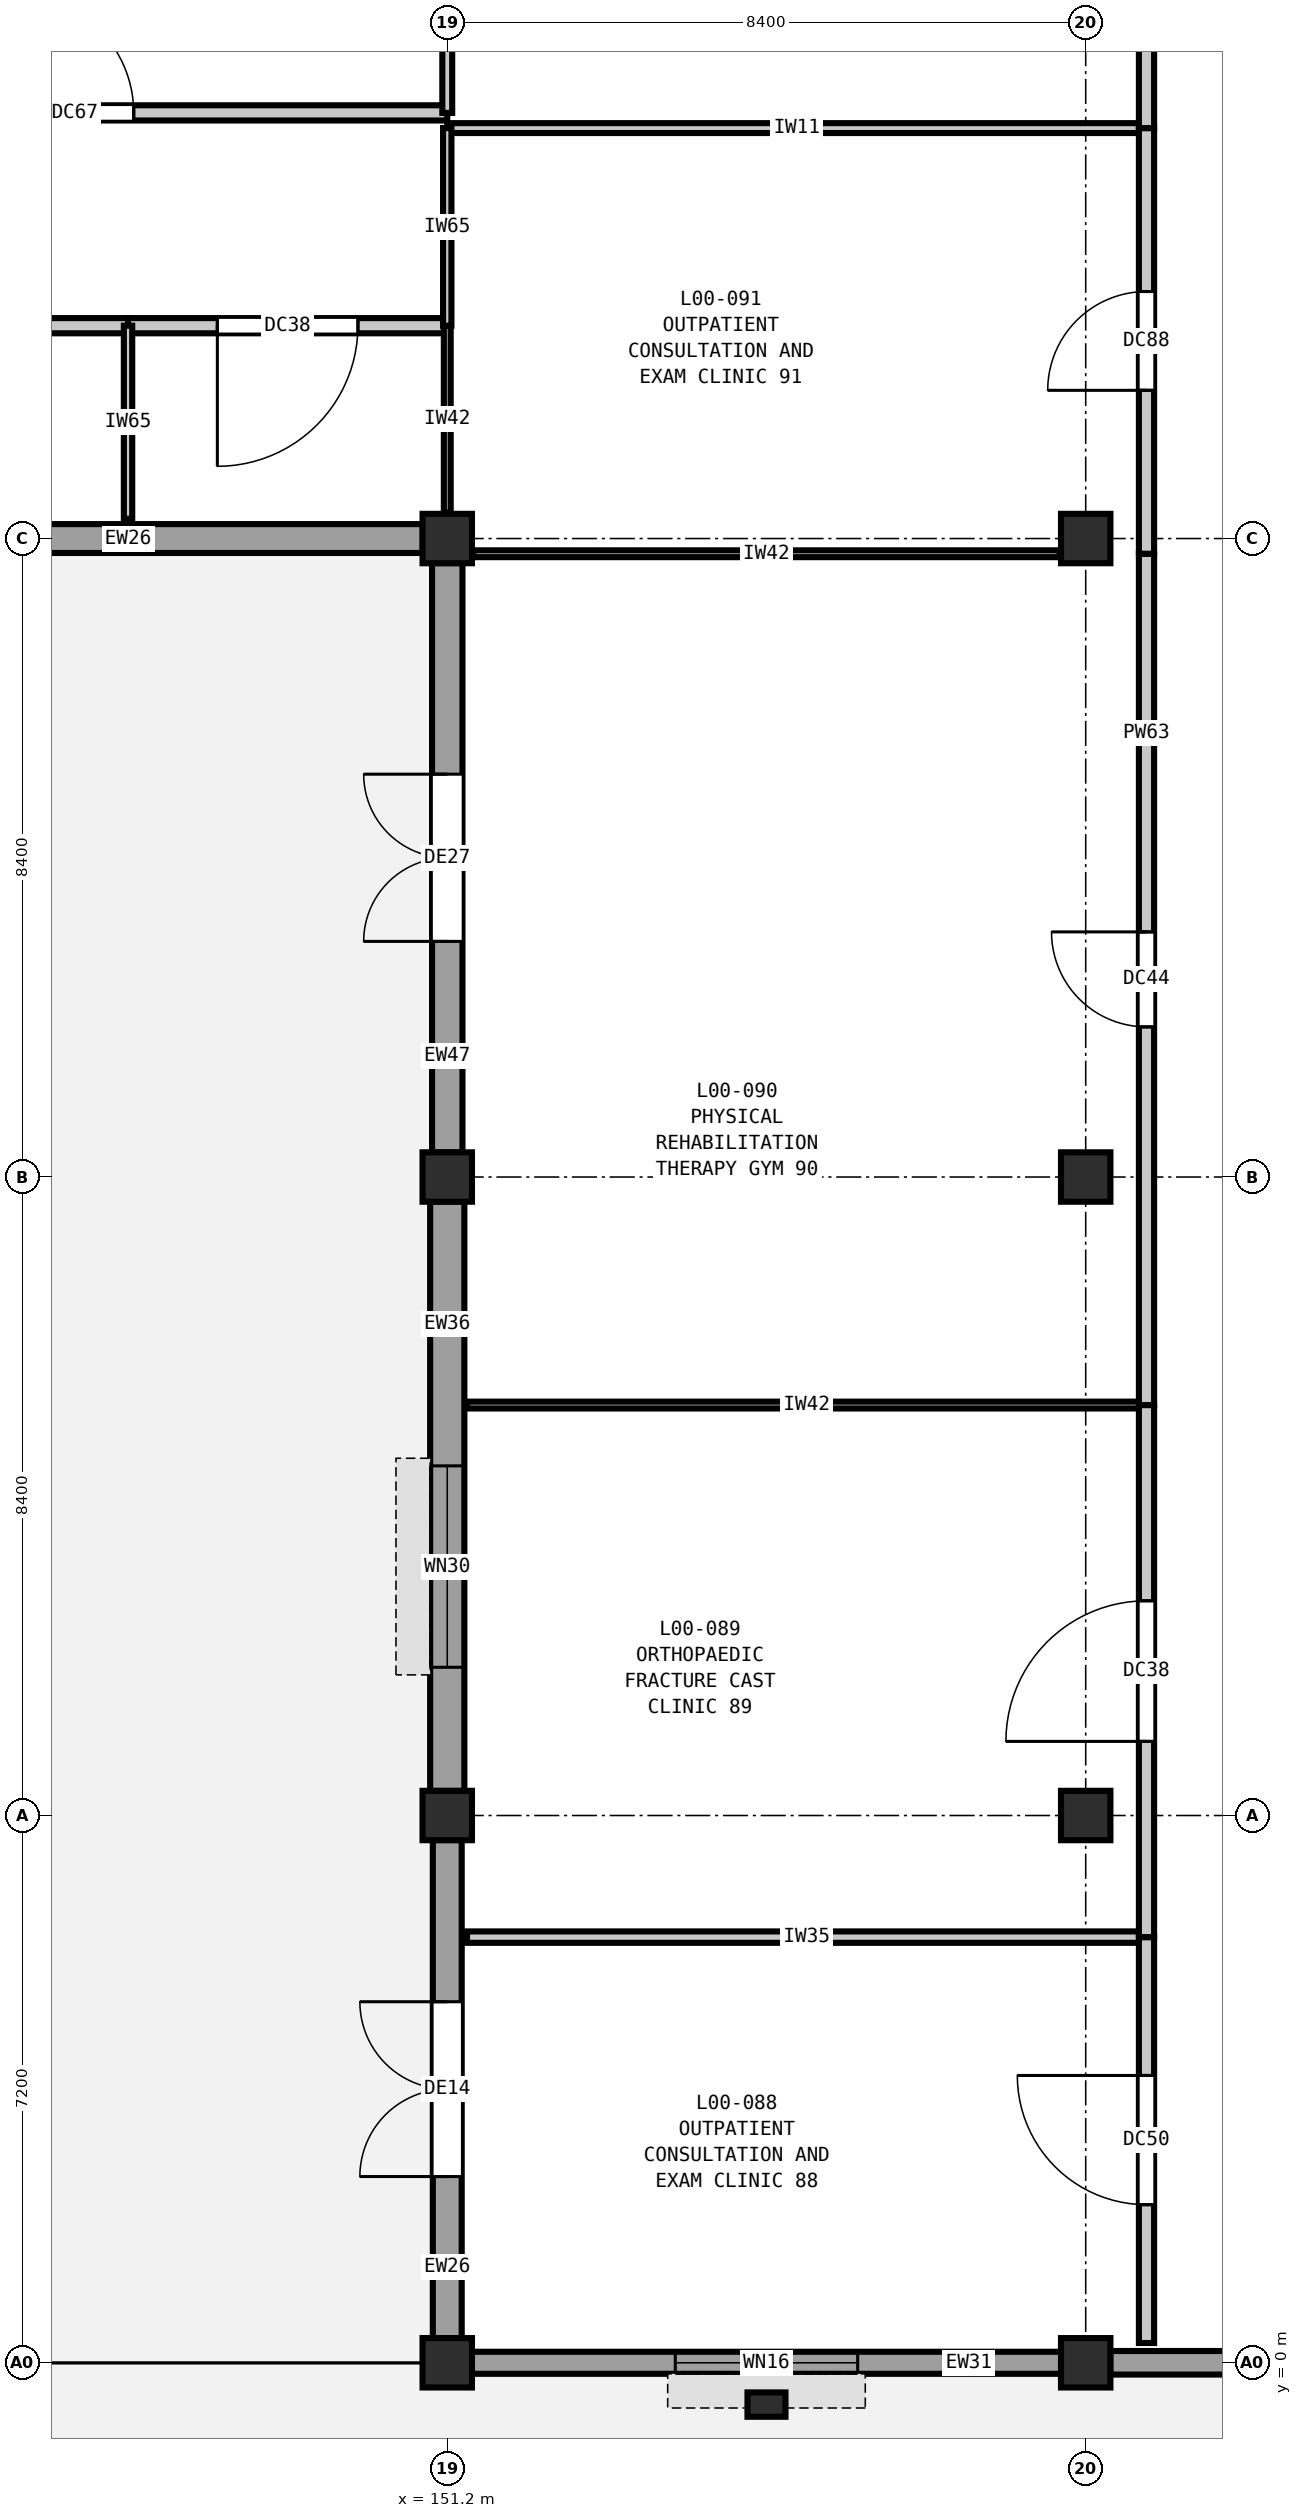
"""IFC4 building model, lengths in metres.
Left out: names, types, materials, properties, quantities, classifications, styles, units other than length and angle.
Written with IfcOpenShell. Run it as: python <this file> out.ifc"""

import sys

from ifc_helpers import new_model, si_unit, direction, frame, frame_2d, origin, origin_2d, place, context, subcontext, project, spatial, rectangle, extrude, element, fill, save


model = new_model("IFC4")
c1 = context("Model", 3, precision=1e-05, world=origin(), true_north=direction((0.0, 1.0)))
c2 = subcontext(c1, "Body", "Model", "MODEL_VIEW")
j1 = project(units=[si_unit("LENGTHUNIT", "METRE"), si_unit("PLANEANGLEUNIT", "RADIAN")], contexts=[c1])
p1 = place(None, origin())
s1 = spatial("IfcSite", under=j1, at=p1, CompositionType="ELEMENT")
p2 = place(p1, origin())
s2 = spatial("IfcBuilding", under=s1, at=p2, CompositionType="ELEMENT")
p3 = place(p2, origin())
s3 = spatial("IfcBuildingStorey", under=s2, at=p3, CompositionType="ELEMENT", Elevation=0.0)
for number, where, z_axis, x_axis in (
    (1, (151.2, 0.0, 0.0), (0.0, 0.0, 1.0), (1.0, 0.0, 0.0)),
    (2, (151.2, 7.2, 0.0), (0.0, 0.0, 1.0), (1.0, 0.0, 0.0)),
    (3, (151.2, 15.6, 0.0), (0.0, 0.0, 1.0), (1.0, 0.0, 0.0)),
    (4, (151.2, 24.0, 0.0), (0.0, 0.0, 1.0), (1.0, 0.0, 0.0)),
    (5, (159.6, 0.0, 0.0), (0.0, 0.0, 1.0), (1.0, 0.0, 0.0)),
    (6, (159.6, 7.2, 0.0), (0.0, 0.0, 1.0), (1.0, 0.0, 0.0)),
    (7, (159.6, 15.6, 0.0), (0.0, 0.0, 1.0), (1.0, 0.0, 0.0)),
    (8, (159.6, 24.0, 0.0), (0.0, 0.0, 1.0), (1.0, 0.0, 0.0)),
):
    element("IfcColumn", number, at=place(p3, frame(where, z_axis=z_axis, x_axis=x_axis)), inside=s3, PredefinedType="COLUMN", context=c2, shape_type="SweptSolid", body=[
        extrude(rectangle(XDim=0.65, YDim=0.65, at=origin_2d()), origin(), (0.0, 0.0, 1.0), 5.4),
    ])
p4 = place(p3, frame((155.4, -0.55, 0.0), z_axis=(0.0, 0.0, 1.0), x_axis=(1.0, 0.0, 0.0)))
e9 = element("IfcColumn", 9, at=p4, inside=s3, PredefinedType="PILASTER", context=c2, shape_type="SweptSolid", body=[
    extrude(rectangle(XDim=0.5, YDim=0.32, at=origin_2d()), origin(), (0.0, 0.0, 1.0), 5.4),
])
p5 = place(p3, frame((167.677, 0.0, 0.0), z_axis=(0.0, 0.0, 1.0), x_axis=(-1.0, 0.0, 0.0)))
e10 = element("IfcWall", 10, at=p5, inside=s3, PredefinedType="SOLIDWALL", context=c2, shape_type="SweptSolid", body=[
    extrude(rectangle(XDim=7.754, YDim=0.31, at=frame_2d((3.877, 0.0))), origin(), (0.0, 0.0, 1.0), 4.68),
])
p6 = place(p3, frame((159.277, 0.0, 0.0), z_axis=(0.0, 0.0, 1.0), x_axis=(-1.0, 0.0, 0.0)))
e11 = element("IfcWall", 11, at=p6, inside=s3, PredefinedType="SOLIDWALL", context=c2, shape_type="SweptSolid", body=[
    extrude(rectangle(XDim=7.754, YDim=0.29, at=frame_2d((3.877, 0.0))), origin(), (0.0, 0.0, 1.0), 4.68),
])
p7 = place(p6, frame((2.677, 0.0, 0.9)))
e12 = element("IfcOpeningElement", 12, at=p7, cuts=e11, PredefinedType="OPENING", context=c2, shape_type="SweptSolid", body=[
    extrude(rectangle(XDim=2.4, YDim=1.95, at=frame_2d((1.2, 0.975))), frame((0.0, 0.155, 0.0), z_axis=(0.0, -1.0, 0.0), x_axis=(1.0, 0.0, 0.0)), (0.0, 0.0, 1.0), 0.31),
])
p8 = place(p3, frame((151.2, 0.323, 0.0), z_axis=(0.0, 0.0, 1.0), x_axis=(0.0, 1.0, 0.0)))
e13 = element("IfcWall", 13, at=p8, inside=s3, PredefinedType="SOLIDWALL", context=c2, shape_type="SweptSolid", body=[
    extrude(rectangle(XDim=6.554, YDim=0.38, at=frame_2d((3.277, 0.0))), origin(), (0.0, 0.0, 1.0), 4.68),
])
p9 = place(p8, frame((2.127, 0.0, 0.0)))
e14 = element("IfcOpeningElement", 14, at=p9, cuts=e13, PredefinedType="OPENING", context=c2, shape_type="SweptSolid", body=[
    extrude(rectangle(XDim=2.3, YDim=2.5, at=frame_2d((1.15, 1.25))), frame((0.0, 0.2, 0.0), z_axis=(0.0, -1.0, 0.0), x_axis=(1.0, 0.0, 0.0)), (0.0, 0.0, 1.0), 0.4),
])
p10 = place(p3, frame((151.2, 7.523, 0.0), z_axis=(0.0, 0.0, 1.0), x_axis=(0.0, 1.0, 0.0)))
e15 = element("IfcWall", 15, at=p10, inside=s3, PredefinedType="SOLIDWALL", context=c2, shape_type="SweptSolid", body=[
    extrude(rectangle(XDim=7.754, YDim=0.45, at=frame_2d((3.877, 0.0))), origin(), (0.0, 0.0, 1.0), 4.68),
])
p11 = place(p10, frame((1.627, 0.0, 0.9)))
e16 = element("IfcOpeningElement", 16, at=p11, cuts=e15, PredefinedType="OPENING", context=c2, shape_type="SweptSolid", body=[
    extrude(rectangle(XDim=2.65, YDim=1.95, at=frame_2d((1.325, 0.975))), frame((0.0, 0.235, 0.0), z_axis=(0.0, -1.0, 0.0), x_axis=(1.0, 0.0, 0.0)), (0.0, 0.0, 1.0), 0.47),
])
p12 = place(p3, frame((151.2, 15.923, 0.0), z_axis=(0.0, 0.0, 1.0), x_axis=(0.0, 1.0, 0.0)))
e17 = element("IfcWall", 17, at=p12, inside=s3, PredefinedType="SOLIDWALL", context=c2, shape_type="SweptSolid", body=[
    extrude(rectangle(XDim=7.754, YDim=0.4, at=frame_2d((3.877, 0.0))), origin(), (0.0, 0.0, 1.0), 4.68),
])
p13 = place(p12, frame((2.777, 0.0, 0.0)))
e18 = element("IfcOpeningElement", 18, at=p13, cuts=e17, PredefinedType="OPENING", context=c2, shape_type="SweptSolid", body=[
    extrude(rectangle(XDim=2.2, YDim=2.4, at=frame_2d((1.1, 1.2))), frame((0.0, 0.21, 0.0), z_axis=(0.0, -1.0, 0.0), x_axis=(1.0, 0.0, 0.0)), (0.0, 0.0, 1.0), 0.42),
])
p14 = place(p3, frame((150.877, 24.0, 0.0), z_axis=(0.0, 0.0, 1.0), x_axis=(-1.0, 0.0, 0.0)))
e19 = element("IfcWall", 19, at=p14, inside=s3, PredefinedType="SOLIDWALL", context=c2, shape_type="SweptSolid", body=[
    extrude(rectangle(XDim=7.754, YDim=0.38, at=frame_2d((3.877, 0.0))), origin(), (0.0, 0.0, 1.0), 4.68),
])
p15 = place(p3, frame((151.46, 5.6, 0.0), z_axis=(0.0, 0.0, 1.0), x_axis=(1.0, 0.0, 0.0)))
e20 = element("IfcWall", 20, at=p15, inside=s3, PredefinedType="PARTITIONING", context=c2, shape_type="SweptSolid", body=[
    extrude(rectangle(XDim=8.94, YDim=0.15, at=frame_2d((4.47, 0.0))), origin(), (0.0, 0.0, 1.0), 5.04),
])
p16 = place(p3, frame((151.46, 12.6, 0.0), z_axis=(0.0, 0.0, 1.0), x_axis=(1.0, 0.0, 0.0)))
e21 = element("IfcWall", 21, at=p16, inside=s3, PredefinedType="PARTITIONING", context=c2, shape_type="SweptSolid", body=[
    extrude(rectangle(XDim=8.94, YDim=0.09, at=frame_2d((4.47, 0.0))), origin(), (0.0, 0.0, 1.0), 5.04),
])
p17 = place(p3, frame((151.54, 23.8, 0.0), z_axis=(0.0, 0.0, 1.0), x_axis=(1.0, 0.0, 0.0)))
e22 = element("IfcWall", 22, at=p17, inside=s3, PredefinedType="PARTITIONING", context=c2, shape_type="SweptSolid", body=[
    extrude(rectangle(XDim=7.72, YDim=0.09, at=frame_2d((3.86, 0.0))), origin(), (0.0, 0.0, 1.0), 4.635),
])
p18 = place(p3, frame((141.4, 26.8, 0.0), z_axis=(0.0, 0.0, 1.0), x_axis=(1.0, 0.0, 0.0)))
e23 = element("IfcWall", 23, at=p18, inside=s3, PredefinedType="PARTITIONING", context=c2, shape_type="SweptSolid", body=[
    extrude(rectangle(XDim=5.6, YDim=0.2, at=frame_2d((2.8, 0.0))), origin(), (0.0, 0.0, 1.0), 5.04),
])
p19 = place(p18, frame((1.95, 0.0, 0.0)))
e24 = element("IfcOpeningElement", 24, at=p19, cuts=e23, PredefinedType="OPENING", context=c2, shape_type="SweptSolid", body=[
    extrude(rectangle(XDim=1.7, YDim=2.3, at=frame_2d((0.85, 1.15))), frame((0.0, 0.11, 0.0), z_axis=(0.0, -1.0, 0.0), x_axis=(1.0, 0.0, 0.0)), (0.0, 0.0, 1.0), 0.22),
])
p20 = place(p3, frame((147.0, 26.8, 0.0), z_axis=(0.0, 0.0, 1.0), x_axis=(1.0, 0.0, 0.0)))
e25 = element("IfcWall", 25, at=p20, inside=s3, PredefinedType="PARTITIONING", context=c2, shape_type="SweptSolid", body=[
    extrude(rectangle(XDim=4.2, YDim=0.2, at=frame_2d((2.1, 0.0))), origin(), (0.0, 0.0, 1.0), 5.04),
])
p21 = place(p20, frame((1.175, 0.0, 0.0)))
e26 = element("IfcOpeningElement", 26, at=p21, cuts=e25, PredefinedType="OPENING", context=c2, shape_type="SweptSolid", body=[
    extrude(rectangle(XDim=1.85, YDim=2.3, at=frame_2d((0.925, 1.15))), frame((0.0, 0.11, 0.0), z_axis=(0.0, -1.0, 0.0), x_axis=(1.0, 0.0, 0.0)), (0.0, 0.0, 1.0), 0.22),
])
p22 = place(p3, frame((151.2, 29.4, 0.0), z_axis=(0.0, 0.0, 1.0), x_axis=(1.0, 0.0, 0.0)))
e27 = element("IfcWall", 27, at=p22, inside=s3, PredefinedType="PARTITIONING", context=c2, shape_type="SweptSolid", body=[
    extrude(rectangle(XDim=9.2, YDim=0.13, at=frame_2d((4.6, 0.0))), origin(), (0.0, 0.0, 1.0), 5.04),
])
p23 = place(p3, frame((141.4, 29.6, 0.0), z_axis=(0.0, 0.0, 1.0), x_axis=(1.0, 0.0, 0.0)))
e28 = element("IfcWall", 28, at=p23, inside=s3, PredefinedType="PARTITIONING", context=c2, shape_type="SweptSolid", body=[
    extrude(rectangle(XDim=9.8, YDim=0.2, at=frame_2d((4.9, 0.0))), origin(), (0.0, 0.0, 1.0), 5.04),
])
p24 = place(p23, frame((4.125, 0.0, 0.0)))
e29 = element("IfcOpeningElement", 29, at=p24, cuts=e28, PredefinedType="OPENING", context=c2, shape_type="SweptSolid", body=[
    extrude(rectangle(XDim=1.55, YDim=2.25, at=frame_2d((0.775, 1.125))), frame((0.0, 0.11, 0.0), z_axis=(0.0, -1.0, 0.0), x_axis=(1.0, 0.0, 0.0)), (0.0, 0.0, 1.0), 0.22),
])
p25 = place(p3, frame((147.0, 24.26, 0.0), z_axis=(0.0, 0.0, 1.0), x_axis=(0.0, 1.0, 0.0)))
e30 = element("IfcWall", 30, at=p25, inside=s3, PredefinedType="PARTITIONING", context=c2, shape_type="SweptSolid", body=[
    extrude(rectangle(XDim=2.54, YDim=0.11, at=frame_2d((1.27, 0.0))), origin(), (0.0, 0.0, 1.0), 5.04),
])
p26 = place(p3, frame((151.2, 24.34, 0.0), z_axis=(0.0, 0.0, 1.0), x_axis=(0.0, 1.0, 0.0)))
e31 = element("IfcWall", 31, at=p26, inside=s3, PredefinedType="PARTITIONING", context=c2, shape_type="SweptSolid", body=[
    extrude(rectangle(XDim=2.46, YDim=0.09, at=frame_2d((1.23, 0.0))), origin(), (0.0, 0.0, 1.0), 4.685),
])
p27 = place(p3, frame((151.2, 26.8, 0.0), z_axis=(0.0, 0.0, 1.0), x_axis=(0.0, 1.0, 0.0)))
e32 = element("IfcWall", 32, at=p27, inside=s3, PredefinedType="PARTITIONING", context=c2, shape_type="SweptSolid", body=[
    extrude(rectangle(XDim=2.6, YDim=0.11, at=frame_2d((1.3, 0.0))), origin(), (0.0, 0.0, 1.0), 4.685),
])
p28 = place(p3, frame((151.2, 29.6, 0.0), z_axis=(0.0, 0.0, 1.0), x_axis=(0.0, 1.0, 0.0)))
e33 = element("IfcWall", 33, at=p28, inside=s3, PredefinedType="PARTITIONING", context=c2, shape_type="SweptSolid", body=[
    extrude(rectangle(XDim=2.46, YDim=0.13, at=frame_2d((1.23, 0.0))), origin(), (0.0, 0.0, 1.0), 4.685),
])
p29 = place(p3, frame((160.4, 0.26, 0.0), z_axis=(0.0, 0.0, 1.0), x_axis=(0.0, 1.0, 0.0)))
e34 = element("IfcWall", 34, at=p29, inside=s3, PredefinedType="PARTITIONING", context=c2, shape_type="SweptSolid", body=[
    extrude(rectangle(XDim=5.34, YDim=0.2, at=frame_2d((2.67, 0.0))), origin(), (0.0, 0.0, 1.0), 5.04),
])
p30 = place(p29, frame((1.82, 0.0, 0.0)))
e35 = element("IfcOpeningElement", 35, at=p30, cuts=e34, PredefinedType="OPENING", context=c2, shape_type="SweptSolid", body=[
    extrude(rectangle(XDim=1.7, YDim=2.3, at=frame_2d((0.85, 1.15))), frame((0.0, 0.11, 0.0), z_axis=(0.0, -1.0, 0.0), x_axis=(1.0, 0.0, 0.0)), (0.0, 0.0, 1.0), 0.22),
])
p31 = place(p3, frame((160.4, 5.6, 0.0), z_axis=(0.0, 0.0, 1.0), x_axis=(0.0, 1.0, 0.0)))
e36 = element("IfcWall", 36, at=p31, inside=s3, PredefinedType="PARTITIONING", context=c2, shape_type="SweptSolid", body=[
    extrude(rectangle(XDim=7.0, YDim=0.2, at=frame_2d((3.5, 0.0))), origin(), (0.0, 0.0, 1.0), 5.04),
])
p32 = place(p31, frame((2.575, 0.0, 0.0)))
e37 = element("IfcOpeningElement", 37, at=p32, cuts=e36, PredefinedType="OPENING", context=c2, shape_type="SweptSolid", body=[
    extrude(rectangle(XDim=1.85, YDim=2.3, at=frame_2d((0.925, 1.15))), frame((0.0, 0.11, 0.0), z_axis=(0.0, -1.0, 0.0), x_axis=(1.0, 0.0, 0.0)), (0.0, 0.0, 1.0), 0.22),
])
p33 = place(p3, frame((160.4, 12.6, 0.0), z_axis=(0.0, 0.0, 1.0), x_axis=(0.0, 1.0, 0.0)))
e38 = element("IfcWall", 38, at=p33, inside=s3, PredefinedType="PARTITIONING", context=c2, shape_type="SweptSolid", body=[
    extrude(rectangle(XDim=11.2, YDim=0.2, at=frame_2d((5.6, 0.0))), origin(), (0.0, 0.0, 1.0), 5.04),
])
p34 = place(p33, frame((4.975, 0.0, 0.0)))
e39 = element("IfcOpeningElement", 39, at=p34, cuts=e38, PredefinedType="OPENING", context=c2, shape_type="SweptSolid", body=[
    extrude(rectangle(XDim=1.25, YDim=2.15, at=frame_2d((0.625, 1.075))), frame((0.0, 0.11, 0.0), z_axis=(0.0, -1.0, 0.0), x_axis=(1.0, 0.0, 0.0)), (0.0, 0.0, 1.0), 0.22),
])
p35 = place(p3, frame((160.4, 23.8, 0.0), z_axis=(0.0, 0.0, 1.0), x_axis=(0.0, 1.0, 0.0)))
e40 = element("IfcWall", 40, at=p35, inside=s3, PredefinedType="PARTITIONING", context=c2, shape_type="SweptSolid", body=[
    extrude(rectangle(XDim=5.6, YDim=0.2, at=frame_2d((2.8, 0.0))), origin(), (0.0, 0.0, 1.0), 5.04),
])
p36 = place(p35, frame((2.15, 0.0, 0.0)))
e41 = element("IfcOpeningElement", 41, at=p36, cuts=e40, PredefinedType="OPENING", context=c2, shape_type="SweptSolid", body=[
    extrude(rectangle(XDim=1.3, YDim=2.2, at=frame_2d((0.65, 1.1))), frame((0.0, 0.11, 0.0), z_axis=(0.0, -1.0, 0.0), x_axis=(1.0, 0.0, 0.0)), (0.0, 0.0, 1.0), 0.22),
])
p37 = place(p3, frame((160.4, 29.4, 0.0), z_axis=(0.0, 0.0, 1.0), x_axis=(0.0, 1.0, 0.0)))
e42 = element("IfcWall", 42, at=p37, inside=s3, PredefinedType="PARTITIONING", context=c2, shape_type="SweptSolid", body=[
    extrude(rectangle(XDim=7.0, YDim=0.2, at=frame_2d((3.5, 0.0))), origin(), (0.0, 0.0, 1.0), 5.04),
])
p38 = place(p37, frame((3.756, 0.0, 0.0)))
e43 = element("IfcOpeningElement", 43, at=p38, cuts=e42, PredefinedType="OPENING", context=c2, shape_type="SweptSolid", body=[
    extrude(rectangle(XDim=1.35, YDim=2.2, at=frame_2d((0.675, 1.1))), frame((0.0, 0.11, 0.0), z_axis=(0.0, -1.0, 0.0), x_axis=(1.0, 0.0, 0.0)), (0.0, 0.0, 1.0), 0.22),
])
p39 = place(p7, origin())
e44 = element("IfcWindow", 44, at=p39, inside=s3, PartitioningType="DOUBLE_PANEL_VERTICAL", PredefinedType="WINDOW", context=c2, shape_type="SweptSolid", body=[
    extrude(rectangle(XDim=2.4, YDim=1.95, at=frame_2d((1.2, 0.975))), frame((0.0, 0.03, 0.0), z_axis=(0.0, -1.0, 0.0), x_axis=(1.0, 0.0, 0.0)), (0.0, 0.0, 1.0), 0.06),
])
fill(e12, e44)
p40 = place(p9, origin())
e45 = element("IfcDoor", 45, at=p40, inside=s3, OperationType="DOUBLE_DOOR_SINGLE_SWING", PredefinedType="DOOR", context=c2, shape_type="SweptSolid", body=[
    extrude(rectangle(XDim=2.3, YDim=2.5, at=frame_2d((1.15, 1.25))), frame((0.0, 0.025, 0.0), z_axis=(0.0, -1.0, 0.0), x_axis=(1.0, 0.0, 0.0)), (0.0, 0.0, 1.0), 0.05),
])
fill(e14, e45)
p41 = place(p11, origin())
e46 = element("IfcWindow", 46, at=p41, inside=s3, PartitioningType="DOUBLE_PANEL_VERTICAL", PredefinedType="WINDOW", context=c2, shape_type="SweptSolid", body=[
    extrude(rectangle(XDim=2.65, YDim=1.95, at=frame_2d((1.325, 0.975))), frame((0.0, 0.03, 0.0), z_axis=(0.0, -1.0, 0.0), x_axis=(1.0, 0.0, 0.0)), (0.0, 0.0, 1.0), 0.06),
])
fill(e16, e46)
p42 = place(p13, origin())
e47 = element("IfcDoor", 47, at=p42, inside=s3, OperationType="DOUBLE_DOOR_SINGLE_SWING", PredefinedType="DOOR", context=c2, shape_type="SweptSolid", body=[
    extrude(rectangle(XDim=2.2, YDim=2.4, at=frame_2d((1.1, 1.2))), frame((0.0, 0.025, 0.0), z_axis=(0.0, -1.0, 0.0), x_axis=(1.0, 0.0, 0.0)), (0.0, 0.0, 1.0), 0.05),
])
fill(e18, e47)
p43 = place(p21, frame((1.85, 0.0, 0.0), z_axis=(0.0, 0.0, 1.0), x_axis=(-1.0, 0.0, 0.0)))
e48 = element("IfcDoor", 48, at=p43, inside=s3, OperationType="SINGLE_SWING_RIGHT", PredefinedType="DOOR", context=c2, shape_type="SweptSolid", body=[
    extrude(rectangle(XDim=1.85, YDim=2.3, at=frame_2d((0.925, 1.15))), frame((0.0, 0.025, 0.0), z_axis=(0.0, -1.0, 0.0), x_axis=(1.0, 0.0, 0.0)), (0.0, 0.0, 1.0), 0.05),
])
fill(e26, e48)
p44 = place(p24, origin())
e49 = element("IfcDoor", 49, at=p44, inside=s3, OperationType="SINGLE_SWING_LEFT", PredefinedType="DOOR", context=c2, shape_type="SweptSolid", body=[
    extrude(rectangle(XDim=1.55, YDim=2.25, at=frame_2d((0.775, 1.125))), frame((0.0, 0.025, 0.0), z_axis=(0.0, -1.0, 0.0), x_axis=(1.0, 0.0, 0.0)), (0.0, 0.0, 1.0), 0.05),
])
fill(e29, e49)
p45 = place(p30, origin())
e50 = element("IfcDoor", 50, at=p45, inside=s3, OperationType="SINGLE_SWING_RIGHT", PredefinedType="DOOR", context=c2, shape_type="SweptSolid", body=[
    extrude(rectangle(XDim=1.7, YDim=2.3, at=frame_2d((0.85, 1.15))), frame((0.0, 0.025, 0.0), z_axis=(0.0, -1.0, 0.0), x_axis=(1.0, 0.0, 0.0)), (0.0, 0.0, 1.0), 0.05),
])
fill(e35, e50)
p46 = place(p32, origin())
e51 = element("IfcDoor", 51, at=p46, inside=s3, OperationType="SINGLE_SWING_LEFT", PredefinedType="DOOR", context=c2, shape_type="SweptSolid", body=[
    extrude(rectangle(XDim=1.85, YDim=2.3, at=frame_2d((0.925, 1.15))), frame((0.0, 0.025, 0.0), z_axis=(0.0, -1.0, 0.0), x_axis=(1.0, 0.0, 0.0)), (0.0, 0.0, 1.0), 0.05),
])
fill(e37, e51)
p47 = place(p34, origin())
e52 = element("IfcDoor", 52, at=p47, inside=s3, OperationType="SINGLE_SWING_RIGHT", PredefinedType="DOOR", context=c2, shape_type="SweptSolid", body=[
    extrude(rectangle(XDim=1.25, YDim=2.15, at=frame_2d((0.625, 1.075))), frame((0.0, 0.025, 0.0), z_axis=(0.0, -1.0, 0.0), x_axis=(1.0, 0.0, 0.0)), (0.0, 0.0, 1.0), 0.05),
])
fill(e39, e52)
p48 = place(p36, origin())
e53 = element("IfcDoor", 53, at=p48, inside=s3, OperationType="SINGLE_SWING_LEFT", PredefinedType="DOOR", context=c2, shape_type="SweptSolid", body=[
    extrude(rectangle(XDim=1.3, YDim=2.2, at=frame_2d((0.65, 1.1))), frame((0.0, 0.025, 0.0), z_axis=(0.0, -1.0, 0.0), x_axis=(1.0, 0.0, 0.0)), (0.0, 0.0, 1.0), 0.05),
])
fill(e41, e53)
save(model, sys.argv[1])
